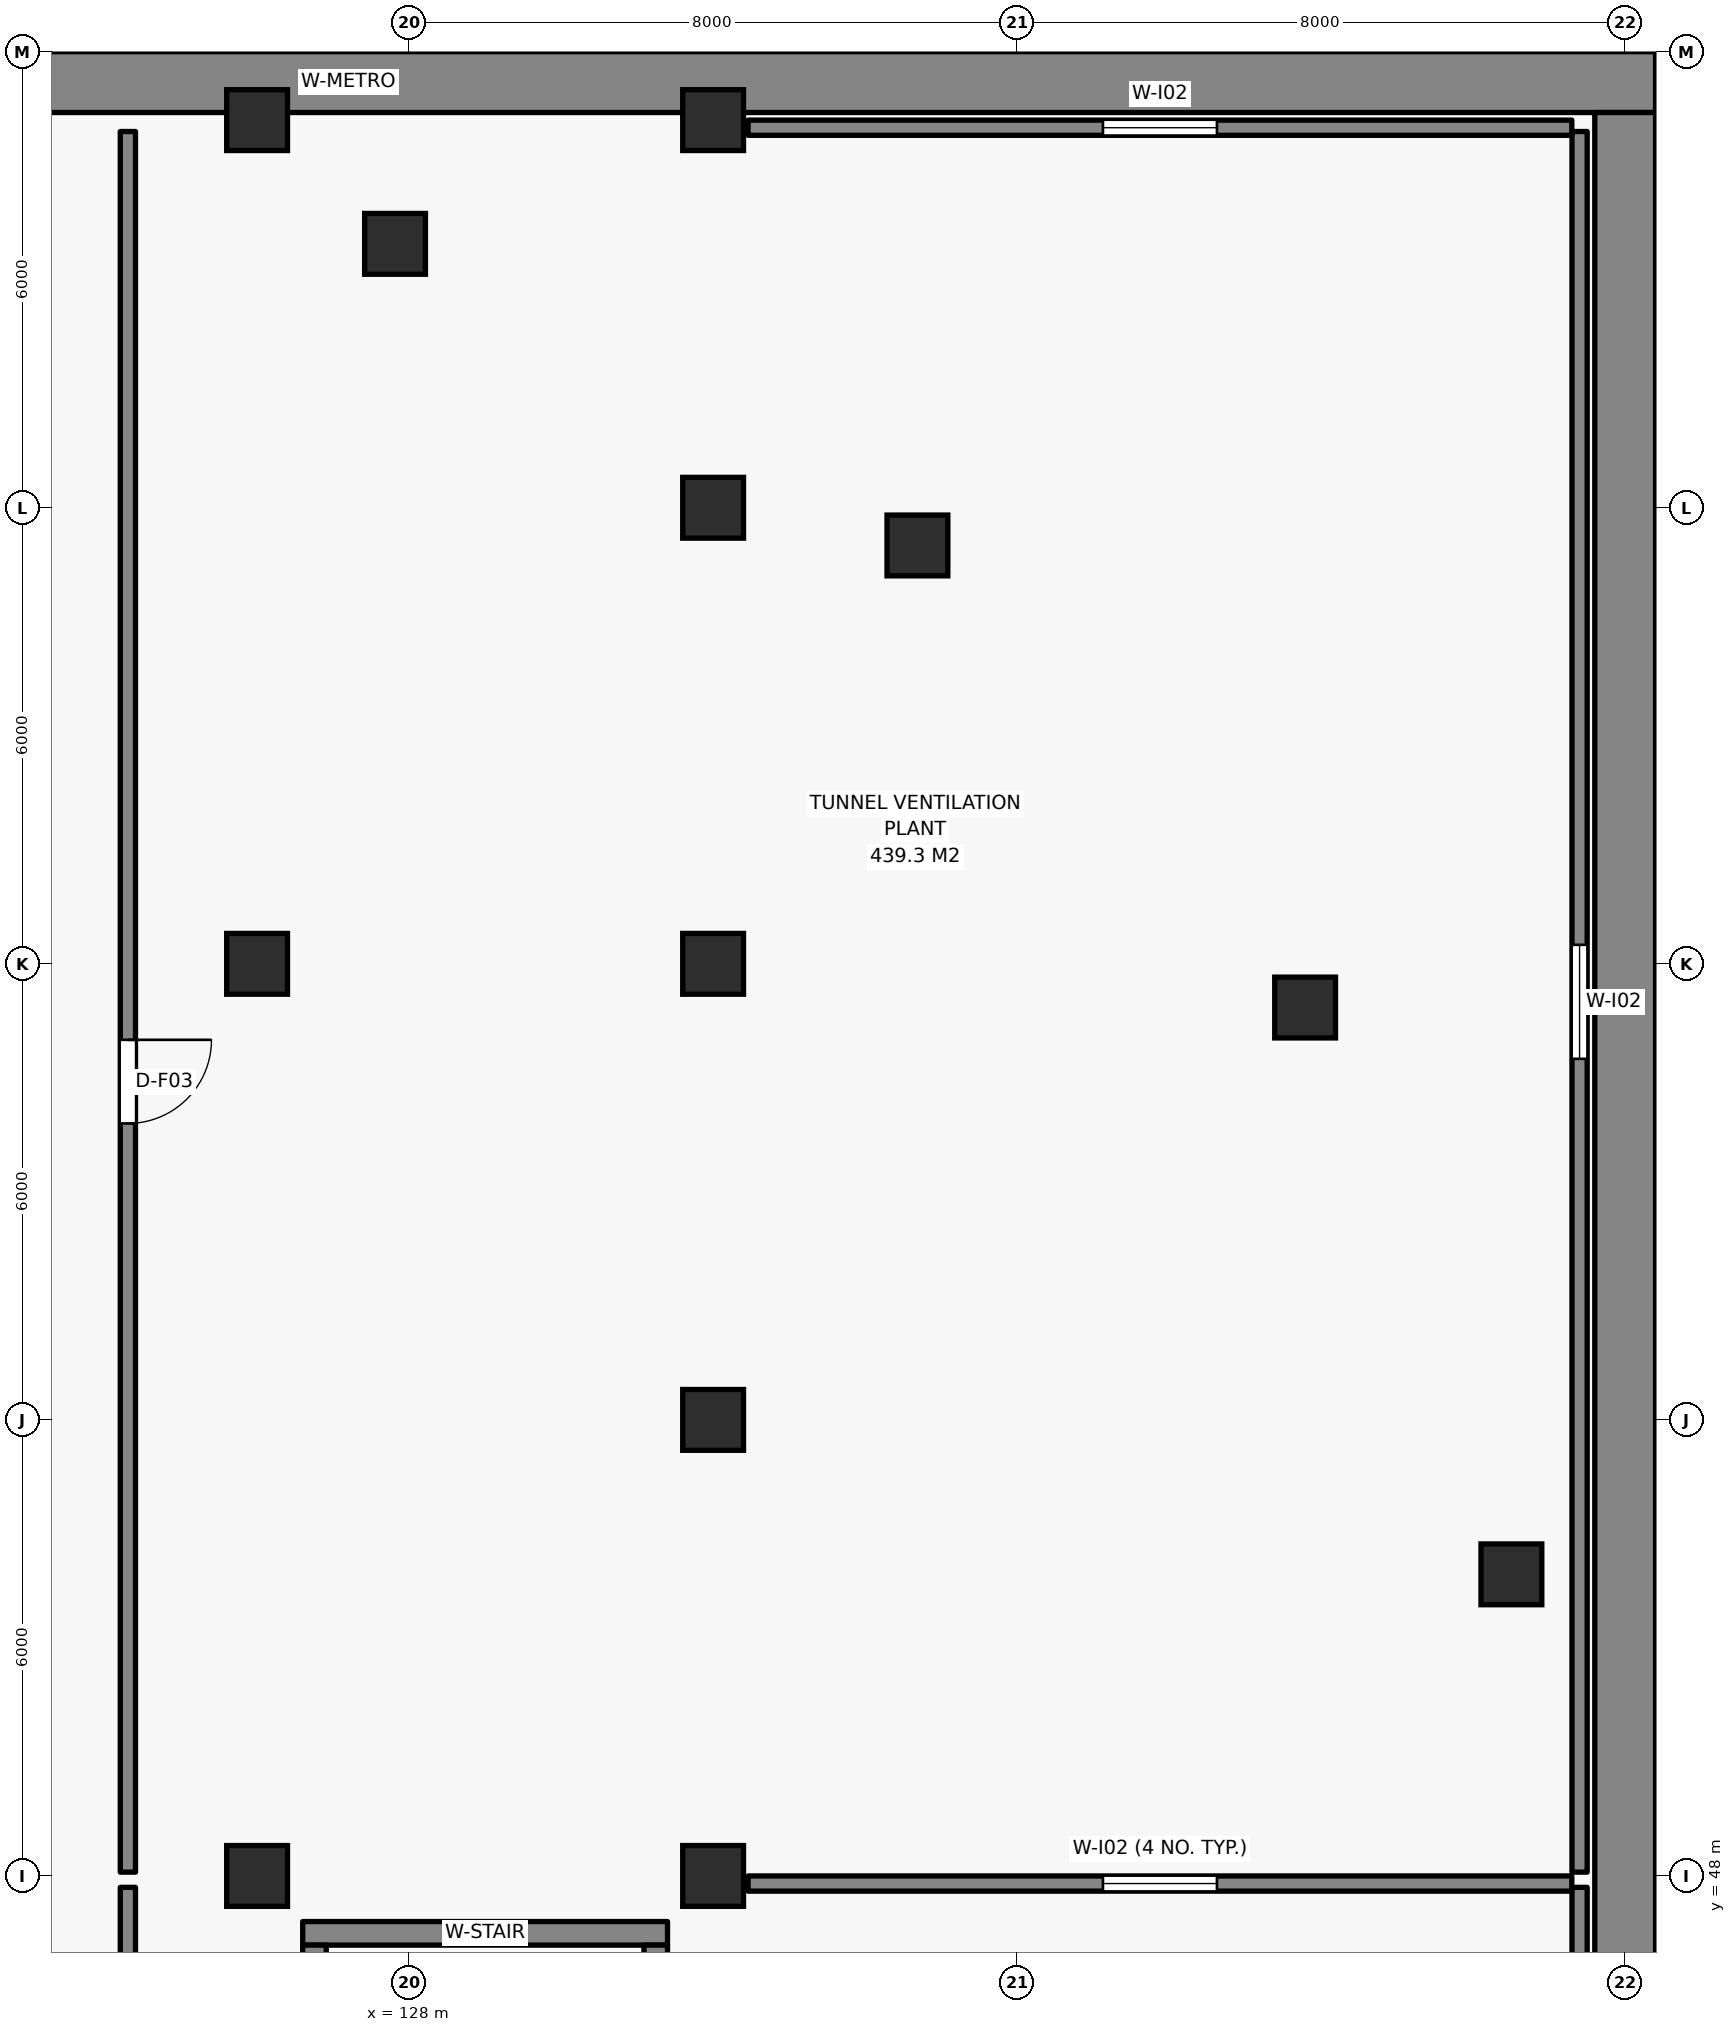
"""IFC4 building model, lengths in metres.
Left out: names, types, materials, properties, quantities, classifications, styles, units other than length and angle.
Written with IfcOpenShell. Run it as: python <this file> out.ifc"""

import sys

from ifc_helpers import new_model, si_unit, direction, frame, frame_2d, origin, origin_2d, place, context, subcontext, project, spatial, rectangle, extrude, element, fill, save


model = new_model("IFC4")
c1 = context("Model", 3, precision=1e-05, world=origin(), true_north=direction((0.0, 1.0)))
c2 = subcontext(c1, "Body", "Model", "MODEL_VIEW")
j1 = project(units=[si_unit("LENGTHUNIT", "METRE"), si_unit("PLANEANGLEUNIT", "RADIAN")], contexts=[c1])
p1 = place(None, origin())
s1 = spatial("IfcSite", under=j1, at=p1, CompositionType="ELEMENT")
p2 = place(p1, origin())
s2 = spatial("IfcBuilding", under=s1, at=p2, CompositionType="ELEMENT")
p3 = place(p2, frame((0.0, 0.0, -7.2)))
s3 = spatial("IfcBuildingStorey", under=s2, at=p3, CompositionType="ELEMENT", Elevation=-7.2)
p4 = place(p3, frame((14.4, 71.6, 0.0), z_axis=(0.0, 0.0, 1.0), x_axis=(1.0, 0.0, 0.0)))
e1 = element("IfcWall", 1, at=p4, inside=s3, PredefinedType="SHEAR", context=c2, shape_type="SweptSolid", body=[
    extrude(rectangle(XDim=130.0, YDim=0.8, at=frame_2d((65.0, 0.0))), origin(), (0.0, 0.0, 1.0), 6.8),
])
p5 = place(p3, frame((144.0, 24.8, 0.0), z_axis=(0.0, 0.0, 1.0), x_axis=(0.0, 1.0, 0.0)))
e2 = element("IfcWall", 2, at=p5, inside=s3, PredefinedType="SHEAR", context=c2, shape_type="SweptSolid", body=[
    extrude(rectangle(XDim=46.4, YDim=0.8, at=frame_2d((23.2, 0.0))), origin(), (0.0, 0.0, 1.0), 6.8),
])
p6 = place(p3, frame((126.6, 47.245, 0.0), z_axis=(0.0, 0.0, 1.0), x_axis=(1.0, 0.0, 0.0)))
e3 = element("IfcWall", 3, at=p6, inside=s3, PredefinedType="SHEAR", context=c2, shape_type="SweptSolid", body=[
    extrude(rectangle(XDim=4.8, YDim=0.31, at=frame_2d((2.4, 0.0))), origin(), (0.0, 0.0, 1.0), 6.8),
])
for number, where, z_axis, x_axis in (
    (4, (126.755, 36.91, 0.0), (0.0, 0.0, 1.0), (0.0, 1.0, 0.0)),
    (5, (131.245, 36.91, 0.0), (0.0, 0.0, 1.0), (0.0, 1.0, 0.0)),
):
    element("IfcWall", number, at=place(p3, frame(where, z_axis=z_axis, x_axis=x_axis)), inside=s3, PredefinedType="SHEAR", context=c2, shape_type="SweptSolid", body=[
        extrude(rectangle(XDim=10.18, YDim=0.31, at=frame_2d((5.09, 0.0))), origin(), (0.0, 0.0, 1.0), 6.8),
    ])
for number, where, z_axis, x_axis in (
    (6, (126.0, 48.0, 0.0), (0.0, 0.0, 1.0), (1.0, 0.0, 0.0)),
    (7, (126.0, 60.0, 0.0), (0.0, 0.0, 1.0), (1.0, 0.0, 0.0)),
    (8, (126.0, 71.1, 0.0), (0.0, 0.0, 1.0), (1.0, 0.0, 0.0)),
    (9, (132.0, 48.0, 0.0), (0.0, 0.0, 1.0), (1.0, 0.0, 0.0)),
    (10, (132.0, 54.0, 0.0), (0.0, 0.0, 1.0), (1.0, 0.0, 0.0)),
    (11, (132.0, 60.0, 0.0), (0.0, 0.0, 1.0), (1.0, 0.0, 0.0)),
    (12, (132.0, 66.0, 0.0), (0.0, 0.0, 1.0), (1.0, 0.0, 0.0)),
    (13, (132.0, 71.1, 0.0), (0.0, 0.0, 1.0), (1.0, 0.0, 0.0)),
    (14, (142.503, 51.968, 0.0), (0.0, 0.0, 1.0), (1.0, 0.0, 0.0)),
    (15, (139.789, 59.425, 0.0), (0.0, 0.0, 1.0), (1.0, 0.0, 0.0)),
    (16, (134.688, 65.504, 0.0), (0.0, 0.0, 1.0), (1.0, 0.0, 0.0)),
    (17, (127.815, 69.472, 0.0), (0.0, 0.0, 1.0), (1.0, 0.0, 0.0)),
):
    element("IfcColumn", number, at=place(p3, frame(where, z_axis=z_axis, x_axis=x_axis)), inside=s3, PredefinedType="COLUMN", context=c2, shape_type="SweptSolid", body=[
        extrude(rectangle(XDim=0.8, YDim=0.8, at=origin_2d()), origin(), (0.0, 0.0, 1.0), 7.2),
    ])
p7 = place(p3, frame((143.4, 25.102, 0.0), z_axis=(0.0, 0.0, 1.0), x_axis=(0.0, 1.0, 0.0)))
e18 = element("IfcWall", 18, at=p7, inside=s3, PredefinedType="PARTITIONING", context=c2, shape_type="SweptSolid", body=[
    extrude(rectangle(XDim=22.748, YDim=0.2, at=frame_2d((11.374, 0.0))), origin(), (0.0, 0.0, 1.0), 6.78),
])
p8 = place(p7, frame((10.624, 0.0, 1.05)))
e19 = element("IfcOpeningElement", 19, at=p8, cuts=e18, PredefinedType="OPENING", context=c2, shape_type="SweptSolid", body=[
    extrude(rectangle(XDim=1.5, YDim=1.2, at=frame_2d((0.75, 0.6))), frame((0.0, 0.11, 0.0), z_axis=(0.0, -1.0, 0.0), x_axis=(1.0, 0.0, 0.0)), (0.0, 0.0, 1.0), 0.22),
])
p9 = place(p3, frame((143.298, 47.9, 0.0), z_axis=(0.0, 0.0, 1.0), x_axis=(-1.0, 0.0, 0.0)))
e20 = element("IfcWall", 20, at=p9, inside=s3, PredefinedType="PARTITIONING", context=c2, shape_type="SweptSolid", body=[
    extrude(rectangle(XDim=10.838, YDim=0.2, at=frame_2d((5.419, 0.0))), origin(), (0.0, 0.0, 1.0), 5.685),
])
p10 = place(p9, frame((4.669, 0.0, 1.05)))
e21 = element("IfcOpeningElement", 21, at=p10, cuts=e20, PredefinedType="OPENING", context=c2, shape_type="SweptSolid", body=[
    extrude(rectangle(XDim=1.5, YDim=1.2, at=frame_2d((0.75, 0.6))), frame((0.0, 0.11, 0.0), z_axis=(0.0, -1.0, 0.0), x_axis=(1.0, 0.0, 0.0)), (0.0, 0.0, 1.0), 0.22),
])
p11 = place(p3, frame((124.3, 47.85, 0.0), z_axis=(0.0, 0.0, 1.0), x_axis=(0.0, -1.0, 0.0)))
e22 = element("IfcWall", 22, at=p11, inside=s3, PredefinedType="PARTITIONING", context=c2, shape_type="SweptSolid", body=[
    extrude(rectangle(XDim=22.8, YDim=0.2, at=frame_2d((11.4, 0.0))), origin(), (0.0, 0.0, 1.0), 5.785),
])
p12 = place(p11, frame((9.8, 0.0, 0.0)))
e23 = element("IfcOpeningElement", 23, at=p12, cuts=e22, PredefinedType="OPENING", context=c2, shape_type="SweptSolid", body=[
    extrude(rectangle(XDim=1.1, YDim=2.15, at=frame_2d((0.55, 1.075))), frame((0.0, 0.11, 0.0), z_axis=(0.0, -1.0, 0.0), x_axis=(1.0, 0.0, 0.0)), (0.0, 0.0, 1.0), 0.22),
])
p13 = place(p3, frame((143.4, 48.05, 0.0), z_axis=(0.0, 0.0, 1.0), x_axis=(0.0, 1.0, 0.0)))
e24 = element("IfcWall", 24, at=p13, inside=s3, PredefinedType="PARTITIONING", context=c2, shape_type="SweptSolid", body=[
    extrude(rectangle(XDim=22.9, YDim=0.2, at=frame_2d((11.45, 0.0))), origin(), (0.0, 0.0, 1.0), 6.78),
])
p14 = place(p13, frame((10.7, 0.0, 1.05)))
e25 = element("IfcOpeningElement", 25, at=p14, cuts=e24, PredefinedType="OPENING", context=c2, shape_type="SweptSolid", body=[
    extrude(rectangle(XDim=1.5, YDim=1.2, at=frame_2d((0.75, 0.6))), frame((0.0, 0.11, 0.0), z_axis=(0.0, -1.0, 0.0), x_axis=(1.0, 0.0, 0.0)), (0.0, 0.0, 1.0), 0.22),
])
p15 = place(p3, frame((143.298, 71.0, 0.0), z_axis=(0.0, 0.0, 1.0), x_axis=(-1.0, 0.0, 0.0)))
e26 = element("IfcWall", 26, at=p15, inside=s3, PredefinedType="PARTITIONING", context=c2, shape_type="SweptSolid", body=[
    extrude(rectangle(XDim=10.838, YDim=0.2, at=frame_2d((5.419, 0.0))), origin(), (0.0, 0.0, 1.0), 5.785),
])
p16 = place(p15, frame((4.669, 0.0, 1.05)))
e27 = element("IfcOpeningElement", 27, at=p16, cuts=e26, PredefinedType="OPENING", context=c2, shape_type="SweptSolid", body=[
    extrude(rectangle(XDim=1.5, YDim=1.2, at=frame_2d((0.75, 0.6))), frame((0.0, 0.11, 0.0), z_axis=(0.0, -1.0, 0.0), x_axis=(1.0, 0.0, 0.0)), (0.0, 0.0, 1.0), 0.22),
])
p17 = place(p3, frame((124.3, 70.95, 0.0), z_axis=(0.0, 0.0, 1.0), x_axis=(0.0, -1.0, 0.0)))
e28 = element("IfcWall", 28, at=p17, inside=s3, PredefinedType="PARTITIONING", context=c2, shape_type="SweptSolid", body=[
    extrude(rectangle(XDim=22.9, YDim=0.2, at=frame_2d((11.45, 0.0))), origin(), (0.0, 0.0, 1.0), 5.785),
])
p18 = place(p17, frame((11.95, 0.0, 0.0)))
e29 = element("IfcOpeningElement", 29, at=p18, cuts=e28, PredefinedType="OPENING", context=c2, shape_type="SweptSolid", body=[
    extrude(rectangle(XDim=1.1, YDim=2.15, at=frame_2d((0.55, 1.075))), frame((0.0, 0.11, 0.0), z_axis=(0.0, -1.0, 0.0), x_axis=(1.0, 0.0, 0.0)), (0.0, 0.0, 1.0), 0.22),
])
p19 = place(p18, origin())
e30 = element("IfcDoor", 30, at=p19, inside=s3, OperationType="SINGLE_SWING_LEFT", PredefinedType="DOOR", context=c2, shape_type="SweptSolid", body=[
    extrude(rectangle(XDim=1.1, YDim=2.15, at=frame_2d((0.55, 1.075))), frame((0.0, 0.025, 0.0), z_axis=(0.0, -1.0, 0.0), x_axis=(1.0, 0.0, 0.0)), (0.0, 0.0, 1.0), 0.05),
])
fill(e29, e30)
p20 = place(p10, origin())
e31 = element("IfcWindow", 31, at=p20, inside=s3, PartitioningType="SINGLE_PANEL", PredefinedType="WINDOW", context=c2, shape_type="SweptSolid", body=[
    extrude(rectangle(XDim=1.5, YDim=1.2, at=frame_2d((0.75, 0.6))), frame((0.0, 0.03, 0.0), z_axis=(0.0, -1.0, 0.0), x_axis=(1.0, 0.0, 0.0)), (0.0, 0.0, 1.0), 0.06),
])
fill(e21, e31)
p21 = place(p14, origin())
e32 = element("IfcWindow", 32, at=p21, inside=s3, PartitioningType="SINGLE_PANEL", PredefinedType="WINDOW", context=c2, shape_type="SweptSolid", body=[
    extrude(rectangle(XDim=1.5, YDim=1.2, at=frame_2d((0.75, 0.6))), frame((0.0, 0.03, 0.0), z_axis=(0.0, -1.0, 0.0), x_axis=(1.0, 0.0, 0.0)), (0.0, 0.0, 1.0), 0.06),
])
fill(e25, e32)
p22 = place(p16, origin())
e33 = element("IfcWindow", 33, at=p22, inside=s3, PartitioningType="SINGLE_PANEL", PredefinedType="WINDOW", context=c2, shape_type="SweptSolid", body=[
    extrude(rectangle(XDim=1.5, YDim=1.2, at=frame_2d((0.75, 0.6))), frame((0.0, 0.03, 0.0), z_axis=(0.0, -1.0, 0.0), x_axis=(1.0, 0.0, 0.0)), (0.0, 0.0, 1.0), 0.06),
])
fill(e27, e33)
save(model, sys.argv[1])
